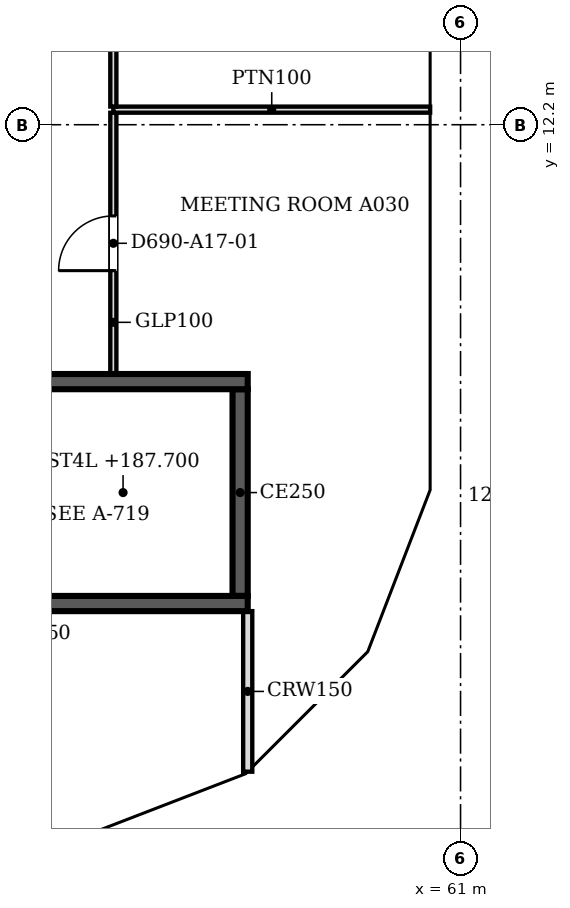
"""IFC4 building model, lengths in metres.
Left out: names, types, materials, properties, quantities, classifications, styles, units other than length and angle.
Written with IfcOpenShell. Run it as: python <this file> out.ifc"""

import sys

from ifc_helpers import new_model, si_unit, direction, frame, frame_2d, origin, place, context, subcontext, project, spatial, polyline, rectangle, outline, extrude, faceted_brep, source, transform, mapped, element, fill, save


model = new_model("IFC4")
c1 = context("Model", 3, precision=1e-05, world=origin(), true_north=direction((0.0, 1.0)))
c2 = subcontext(c1, "Body", "Model", "MODEL_VIEW")
j1 = project(units=[si_unit("LENGTHUNIT", "METRE"), si_unit("PLANEANGLEUNIT", "RADIAN")], contexts=[c1])
p1 = place(None, origin())
s1 = spatial("IfcSite", under=j1, at=p1, CompositionType="ELEMENT")
p2 = place(p1, origin())
s2 = spatial("IfcBuilding", under=s1, at=p2, CompositionType="ELEMENT")
p3 = place(p2, frame((0.0, 0.0, 185.8)))
s3 = spatial("IfcBuildingStorey", under=s2, at=p3, CompositionType="ELEMENT", Elevation=185.8)
m1 = source(origin(), c2, "Body", "Brep", [
    faceted_brep([(0.047, -0.25, 0.0), (2.997, -0.25, 3.8), (0.047, -0.25, 7.6), (0.0, -0.25, 7.541), (0.0, -0.25, 0.059), (0.093, 0.25, 7.54), (2.944, 0.25, 3.868), (2.944, 0.25, 3.732), (0.093, 0.25, 0.06), (2.997, 0.0, 3.8), (0.047, 0.0, 0.0), (0.047, 0.0, 7.6)], [[[0, 1, 2, 3, 4]], [[5, 6, 7, 8]], [[8, 7, 9, 1, 0, 10]], [[6, 5, 11, 2, 1, 9]], [[3, 2, 11]], [[10, 0, 4]], [[8, 10, 4, 3, 11, 5]], [[9, 7, 6]]]),
])
p4 = place(p3, frame((54.81, 0.233, -3.8), z_axis=(0.0, 0.0, 1.0), x_axis=(0.932990326376, 0.359901446078, 0.0)))
e1 = element("IfcWall", 1, at=p4, inside=s3, PredefinedType="SOLIDWALL", context=c2, shape_type="MappedRepresentation", body=[
    mapped(m1, transform((0.0, 0.0, 0.0), scale=1.0)),
])
m2 = source(origin(), c2, "Body", "SweptSolid", [
    extrude(outline(polyline([(0.247, 0.665), (2.681, 3.8), (0.247, 6.935), (0.247, 0.665)])), frame((0.0, 0.26, 0.0), z_axis=(0.0, -1.0, 0.0), x_axis=(1.0, 0.0, 0.0)), (0.0, 0.0, 1.0), 0.52),
])
p5 = place(p4, origin())
e2 = element("IfcOpeningElement", 2, at=p5, cuts=e1, PredefinedType="OPENING", context=c2, shape_type="MappedRepresentation", body=[
    mapped(m2, transform((0.0, 0.0, 0.0), scale=1.0)),
])
m3 = source(origin(), c2, "Body", "Brep", [
    faceted_brep([(2.944, -0.25, 0.0), (2.997, -0.25, 0.068), (2.997, -0.25, 7.532), (2.944, -0.25, 7.6), (0.0, -0.25, 3.8), (0.053, 0.25, 3.868), (2.891, 0.25, 7.532), (2.891, 0.25, 0.068), (0.053, 0.25, 3.732), (2.944, 0.0, 0.0), (2.944, 0.0, 7.6), (0.0, 0.0, 3.8)], [[[0, 1, 2, 3, 4]], [[5, 6, 7, 8]], [[1, 0, 9]], [[10, 3, 2]], [[6, 5, 11, 4, 3, 10]], [[8, 7, 9, 0, 4, 11]], [[8, 11, 5]], [[1, 9, 7, 6, 10, 2]]]),
])
p6 = place(p3, frame((57.606, 1.312, -3.8), z_axis=(0.0, 0.0, 1.0), x_axis=(0.707147509625, 0.707066050402, 0.0)))
e3 = element("IfcWall", 3, at=p6, inside=s3, PredefinedType="SOLIDWALL", context=c2, shape_type="MappedRepresentation", body=[
    mapped(m3, transform((0.0, 0.0, 0.0), scale=1.0)),
])
m4 = source(origin(), c2, "Body", "SweptSolid", [
    extrude(outline(polyline([(2.744, 6.934), (0.316, 3.8), (2.744, 0.666), (2.744, 6.934)])), frame((0.0, 0.26, 0.0), z_axis=(0.0, -1.0, 0.0), x_axis=(1.0, 0.0, 0.0)), (0.0, 0.0, 1.0), 0.52),
])
p7 = place(p6, origin())
e4 = element("IfcOpeningElement", 4, at=p7, cuts=e3, PredefinedType="OPENING", context=c2, shape_type="MappedRepresentation", body=[
    mapped(m4, transform((0.0, 0.0, 0.0), scale=1.0)),
])
m5 = source(origin(), c2, "Body", "Brep", [
    faceted_brep([(0.053, -0.25, 0.0), (3.003, -0.25, 3.8), (0.053, -0.25, 7.6), (0.0, -0.25, 7.532), (0.0, -0.25, 0.068), (0.106, 0.25, 7.532), (2.957, 0.25, 3.86), (2.957, 0.25, 3.74), (0.106, 0.25, 0.068), (3.003, 0.0, 3.8), (0.053, 0.0, 0.0), (0.053, 0.0, 7.6)], [[[0, 1, 2, 3, 4]], [[5, 6, 7, 8]], [[8, 7, 9, 1, 0, 10]], [[6, 5, 11, 2, 1, 9]], [[3, 2, 11]], [[10, 0, 4]], [[8, 10, 4, 3, 11, 5]], [[9, 7, 6]]]),
])
p8 = place(p3, frame((59.669, 3.344, -3.8), z_axis=(0.0, 0.0, 1.0), x_axis=(0.35992665181, 0.932980602862, 0.0)))
e5 = element("IfcWall", 5, at=p8, inside=s3, PredefinedType="SOLIDWALL", context=c2, shape_type="MappedRepresentation", body=[
    mapped(m5, transform((0.0, 0.0, 0.0), scale=1.0)),
])
m6 = source(origin(), c2, "Body", "SweptSolid", [
    extrude(outline(polyline([(0.253, 0.665), (2.687, 3.8), (0.253, 6.935), (0.253, 0.665)])), frame((0.0, 0.26, 0.0), z_axis=(0.0, -1.0, 0.0), x_axis=(1.0, 0.0, 0.0)), (0.0, 0.0, 1.0), 0.52),
])
p9 = place(p8, origin())
e6 = element("IfcOpeningElement", 6, at=p9, cuts=e5, PredefinedType="OPENING", context=c2, shape_type="MappedRepresentation", body=[
    mapped(m6, transform((0.0, 0.0, 0.0), scale=1.0)),
])
m7 = source(origin(), c2, "Body", "Brep", [
    faceted_brep([(3.003, -0.25, 0.0), (6.053, -0.25, 3.8), (3.003, -0.25, 7.6), (0.0, -0.25, 3.8), (0.047, 0.25, 3.859), (3.003, 0.25, 7.6), (6.053, 0.25, 3.8), (3.003, 0.25, 0.0), (0.047, 0.25, 3.741), (0.0, 0.0, 3.8)], [[[0, 1, 2, 3]], [[4, 5, 6, 7, 8]], [[7, 6, 1, 0]], [[6, 5, 2, 1]], [[5, 4, 9, 3, 2]], [[8, 7, 0, 3, 9]], [[8, 9, 4]]]),
])
p10 = place(p3, frame((60.75, 6.146, -3.8), z_axis=(0.0, 0.0, 1.0), x_axis=(0.0, 1.0, 0.0)))
e7 = element("IfcWall", 7, at=p10, inside=s3, PredefinedType="SOLIDWALL", context=c2, shape_type="MappedRepresentation", body=[
    mapped(m7, transform((0.0, 0.0, 0.0), scale=1.0)),
])
m8 = source(origin(), c2, "Body", "SweptSolid", [
    extrude(outline(polyline([(3.005, 0.401), (5.733, 3.8), (3.005, 7.199), (0.319, 3.8), (3.005, 0.401)])), frame((0.0, 0.26, 0.0), z_axis=(0.0, -1.0, 0.0), x_axis=(1.0, 0.0, 0.0)), (0.0, 0.0, 1.0), 0.52),
])
p11 = place(p10, origin())
e8 = element("IfcOpeningElement", 8, at=p11, cuts=e7, PredefinedType="OPENING", context=c2, shape_type="MappedRepresentation", body=[
    mapped(m8, transform((0.0, 0.0, 0.0), scale=1.0)),
])
m9 = source(origin(), c2, "Body", "SweptSolid", [
    extrude(outline(polyline([(3.05, 0.0), (6.1, 3.8), (3.05, 7.6), (0.0, 3.8), (3.05, 0.0)])), frame((0.0, 0.25, 0.0), z_axis=(0.0, -1.0, 0.0), x_axis=(1.0, 0.0, 0.0)), (0.0, 0.0, 1.0), 0.5),
])
p12 = place(p3, frame((60.75, 12.2, -3.8), z_axis=(0.0, 0.0, 1.0), x_axis=(0.0, 1.0, 0.0)))
e9 = element("IfcWall", 9, at=p12, inside=s3, PredefinedType="SOLIDWALL", context=c2, shape_type="MappedRepresentation", body=[
    mapped(m9, transform((0.0, 0.0, 0.0), scale=1.0)),
])
m10 = source(origin(), c2, "Body", "SweptSolid", [
    extrude(outline(polyline([(3.05, 0.399), (5.78, 3.8), (3.05, 7.201), (0.321, 3.8), (3.05, 0.399)])), frame((0.0, 0.26, 0.0), z_axis=(0.0, -1.0, 0.0), x_axis=(1.0, 0.0, 0.0)), (0.0, 0.0, 1.0), 0.52),
])
p13 = place(p12, origin())
e10 = element("IfcOpeningElement", 10, at=p13, cuts=e9, PredefinedType="OPENING", context=c2, shape_type="MappedRepresentation", body=[
    mapped(m10, transform((0.0, 0.0, 0.0), scale=1.0)),
])
p14 = place(p2, frame((0.0, 0.0, 189.6)))
s4 = spatial("IfcBuildingStorey", under=s2, at=p14, CompositionType="ELEMENT", Elevation=189.6)
m11 = source(origin(), c2, "Body", "Brep", [
    faceted_brep([(2.95, -0.25, 0.0), (3.003, -0.25, 0.068), (3.003, -0.25, 7.531), (2.95, -0.25, 7.6), (0.0, -0.25, 3.8), (0.047, 0.25, 3.86), (2.898, 0.25, 7.532), (2.898, 0.25, 0.068), (0.047, 0.25, 3.74), (2.95, 0.0, 0.0), (2.95, 0.0, 7.6), (0.0, 0.0, 3.8)], [[[0, 1, 2, 3, 4]], [[5, 6, 7, 8]], [[1, 0, 9]], [[10, 3, 2]], [[6, 5, 11, 4, 3, 10]], [[8, 7, 9, 0, 4, 11]], [[8, 11, 5]], [[1, 9, 7, 6, 10, 2]]]),
])
p15 = place(p14, frame((54.854, 0.25, -3.8), z_axis=(0.0, 0.0, 1.0), x_axis=(0.932970071518, 0.359953949349, 0.0)))
e11 = element("IfcWall", 11, at=p15, inside=s4, PredefinedType="SOLIDWALL", context=c2, shape_type="MappedRepresentation", body=[
    mapped(m11, transform((0.0, 0.0, 0.0), scale=1.0)),
])
m12 = source(origin(), c2, "Body", "SweptSolid", [
    extrude(outline(polyline([(2.75, 6.935), (0.316, 3.8), (2.75, 0.665), (2.75, 6.935)])), frame((0.0, 0.26, 0.0), z_axis=(0.0, -1.0, 0.0), x_axis=(1.0, 0.0, 0.0)), (0.0, 0.0, 1.0), 0.52),
])
p16 = place(p15, origin())
e12 = element("IfcOpeningElement", 12, at=p16, cuts=e11, PredefinedType="OPENING", context=c2, shape_type="MappedRepresentation", body=[
    mapped(m12, transform((0.0, 0.0, 0.0), scale=1.0)),
])
m13 = source(origin(), c2, "Body", "Brep", [
    faceted_brep([(0.053, -0.25, 0.0), (2.997, -0.25, 3.8), (0.053, -0.25, 7.6), (0.0, -0.25, 7.532), (0.0, -0.25, 0.068), (0.106, 0.25, 7.531), (2.944, 0.25, 3.868), (2.944, 0.25, 3.732), (0.106, 0.25, 0.068), (2.997, 0.0, 3.8), (0.053, 0.0, 0.0), (0.053, 0.0, 7.6)], [[[0, 1, 2, 3, 4]], [[5, 6, 7, 8]], [[8, 7, 9, 1, 0, 10]], [[6, 5, 11, 2, 1, 9]], [[3, 2, 11]], [[10, 0, 4]], [[8, 10, 4, 3, 11, 5]], [[7, 6, 9]]]),
])
p17 = place(p14, frame((57.569, 1.274, -3.8), z_axis=(0.0, 0.0, 1.0), x_axis=(0.707066050402, 0.707147509625, 0.0)))
e13 = element("IfcWall", 13, at=p17, inside=s4, PredefinedType="SOLIDWALL", context=c2, shape_type="MappedRepresentation", body=[
    mapped(m13, transform((0.0, 0.0, 0.0), scale=1.0)),
])
m14 = source(origin(), c2, "Body", "SweptSolid", [
    extrude(outline(polyline([(0.253, 0.666), (2.681, 3.8), (0.253, 6.934), (0.253, 0.666)])), frame((0.0, 0.26, 0.0), z_axis=(0.0, -1.0, 0.0), x_axis=(1.0, 0.0, 0.0)), (0.0, 0.0, 1.0), 0.52),
])
p18 = place(p17, origin())
e14 = element("IfcOpeningElement", 14, at=p18, cuts=e13, PredefinedType="OPENING", context=c2, shape_type="MappedRepresentation", body=[
    mapped(m14, transform((0.0, 0.0, 0.0), scale=1.0)),
])
m15 = source(origin(), c2, "Body", "Brep", [
    faceted_brep([(2.95, -0.25, 0.0), (2.997, -0.25, 0.059), (2.997, -0.25, 7.541), (2.95, -0.25, 7.6), (0.0, -0.25, 3.8), (0.053, 0.25, 3.868), (2.904, 0.25, 7.54), (2.904, 0.25, 0.06), (0.053, 0.25, 3.732), (2.95, 0.0, 0.0), (2.95, 0.0, 7.6), (0.0, 0.0, 3.8)], [[[0, 1, 2, 3, 4]], [[5, 6, 7, 8]], [[1, 0, 9]], [[10, 3, 2]], [[6, 5, 11, 4, 3, 10]], [[8, 7, 9, 0, 4, 11]], [[8, 11, 5]], [[1, 9, 7, 6, 10, 2]]]),
])
p19 = place(p14, frame((59.688, 3.394, -3.8), z_axis=(0.0, 0.0, 1.0), x_axis=(0.359972353723, 0.932962970624, 0.0)))
e15 = element("IfcWall", 15, at=p19, inside=s4, PredefinedType="SOLIDWALL", context=c2, shape_type="MappedRepresentation", body=[
    mapped(m15, transform((0.0, 0.0, 0.0), scale=1.0)),
])
p20 = place(p19, origin())
e16 = element("IfcOpeningElement", 16, at=p20, cuts=e15, PredefinedType="OPENING", context=c2, shape_type="MappedRepresentation", body=[
    mapped(m12, transform((0.0, 0.0, 0.0), scale=1.0)),
])
m16 = source(origin(), c2, "Body", "Brep", [
    faceted_brep([(0.047, -0.25, 0.0), (3.05, -0.25, 3.8), (0.047, -0.25, 7.6), (0.0, -0.25, 7.54), (0.0, -0.25, 0.06), (0.093, 0.25, 7.541), (3.05, 0.25, 3.8), (0.093, 0.25, 0.059), (0.047, 0.0, 0.0), (0.047, 0.0, 7.6)], [[[0, 1, 2, 3, 4]], [[5, 6, 7]], [[7, 6, 1, 0, 8]], [[6, 5, 9, 2, 1]], [[3, 2, 9]], [[8, 0, 4]], [[7, 8, 4, 3, 9, 5]]]),
])
p21 = place(p14, frame((60.75, 6.1, -3.8), z_axis=(0.0, 0.0, 1.0), x_axis=(0.0, 1.0, 0.0)))
e17 = element("IfcWall", 17, at=p21, inside=s4, PredefinedType="SOLIDWALL", context=c2, shape_type="MappedRepresentation", body=[
    mapped(m16, transform((0.0, 0.0, 0.0), scale=1.0)),
])
m17 = source(origin(), c2, "Body", "SweptSolid", [
    extrude(outline(polyline([(0.247, 0.656), (2.731, 3.8), (0.247, 6.944), (0.247, 0.656)])), frame((0.0, 0.26, 0.0), z_axis=(0.0, -1.0, 0.0), x_axis=(1.0, 0.0, 0.0)), (0.0, 0.0, 1.0), 0.52),
])
p22 = place(p21, origin())
e18 = element("IfcOpeningElement", 18, at=p22, cuts=e17, PredefinedType="OPENING", context=c2, shape_type="MappedRepresentation", body=[
    mapped(m17, transform((0.0, 0.0, 0.0), scale=1.0)),
])
m18 = source(origin(), c2, "Body", "SweptSolid", [
    extrude(outline(polyline([(3.05, 0.0), (6.1, 3.8), (3.05, 7.6), (0.0, 3.8), (3.05, 0.0)])), frame((0.0, 0.25, 0.0), z_axis=(0.0, -1.0, 0.0), x_axis=(1.0, 0.0, 0.0)), (0.0, 0.0, 1.0), 0.5),
])
p23 = place(p14, frame((60.75, 9.15, -3.8), z_axis=(0.0, 0.0, 1.0), x_axis=(0.0, 1.0, 0.0)))
e19 = element("IfcWall", 19, at=p23, inside=s4, PredefinedType="SOLIDWALL", context=c2, shape_type="MappedRepresentation", body=[
    mapped(m18, transform((0.0, 0.0, 0.0), scale=1.0)),
])
m19 = source(origin(), c2, "Body", "SweptSolid", [
    extrude(outline(polyline([(3.05, 0.399), (5.78, 3.8), (3.05, 7.2), (0.321, 3.8), (3.05, 0.399)])), frame((0.0, 0.26, 0.0), z_axis=(0.0, -1.0, 0.0), x_axis=(1.0, 0.0, 0.0)), (0.0, 0.0, 1.0), 0.52),
])
p24 = place(p23, origin())
e20 = element("IfcOpeningElement", 20, at=p24, cuts=e19, PredefinedType="OPENING", context=c2, shape_type="MappedRepresentation", body=[
    mapped(m19, transform((0.0, 0.0, 0.0), scale=1.0)),
])
p25 = place(p3, frame((57.5, 4.325, 0.0), z_axis=(0.0, 0.0, 1.0), x_axis=(-1.0, 0.0, 0.0)))
e21 = element("IfcWall", 21, at=p25, inside=s3, PredefinedType="SOLIDWALL", context=c2, shape_type="SweptSolid", body=[
    extrude(rectangle(XDim=8.5, YDim=0.25, at=frame_2d((4.25, 0.0))), origin(), (0.0, 0.0, 1.0), 3.8),
])
m20 = source(origin(), c2, "Body", "SweptSolid", [
    extrude(rectangle(XDim=1.2, YDim=2.1, at=frame_2d((0.6, 1.05))), frame((0.0, 0.135, 0.0), z_axis=(0.0, -1.0, 0.0), x_axis=(1.0, 0.0, 0.0)), (0.0, 0.0, 1.0), 0.27),
])
p26 = place(p25, frame((6.9, 0.0, 0.0)))
e22 = element("IfcOpeningElement", 22, at=p26, cuts=e21, PredefinedType="OPENING", context=c2, shape_type="MappedRepresentation", body=[
    mapped(m20, transform((0.0, 0.0, 0.0), scale=1.0)),
])
p27 = place(p3, frame((49.0, 7.975, 0.0), z_axis=(0.0, 0.0, 1.0), x_axis=(1.0, 0.0, 0.0)))
e23 = element("IfcWall", 23, at=p27, inside=s3, PredefinedType="SOLIDWALL", context=c2, shape_type="SweptSolid", body=[
    extrude(rectangle(XDim=8.5, YDim=0.25, at=frame_2d((4.25, 0.0))), origin(), (0.0, 0.0, 1.0), 3.8),
])
p28 = place(p3, frame((57.375, 7.85, 0.0), z_axis=(0.0, 0.0, 1.0), x_axis=(0.0, -1.0, 0.0)))
e24 = element("IfcWall", 24, at=p28, inside=s3, PredefinedType="SOLIDWALL", context=c2, shape_type="SweptSolid", body=[
    extrude(rectangle(XDim=3.4, YDim=0.25, at=frame_2d((1.7, 0.0))), origin(), (0.0, 0.0, 1.0), 3.8),
])
p29 = place(p3, frame((57.5, 1.559, 0.0), z_axis=(0.0, 0.0, 1.0), x_axis=(0.0, 1.0, 0.0)))
e25 = element("IfcWall", 25, at=p29, inside=s3, PredefinedType="PARTITIONING", context=c2, shape_type="SweptSolid", body=[
    extrude(rectangle(XDim=2.641, YDim=0.15, at=frame_2d((1.32, 0.0))), origin(), (0.0, 0.0, 1.0), 3.067),
])
p30 = place(p3, frame((55.29, 12.397, 0.0), z_axis=(0.0, 0.0, 1.0), x_axis=(0.0, -1.0, 0.0)))
e26 = element("IfcWall", 26, at=p30, inside=s3, PredefinedType="PARTITIONING", context=c2, shape_type="SweptSolid", body=[
    extrude(rectangle(XDim=4.297, YDim=0.1, at=frame_2d((2.148, 0.0))), origin(), (0.0, 0.0, 1.0), 3.067),
])
m21 = source(origin(), c2, "Body", "SweptSolid", [
    extrude(rectangle(XDim=0.9, YDim=2.1, at=frame_2d((0.45, 1.05))), frame((0.0, 0.06, 0.0), z_axis=(0.0, -1.0, 0.0), x_axis=(1.0, 0.0, 0.0)), (0.0, 0.0, 1.0), 0.12),
])
p31 = place(p30, frame((1.697, 0.0, 0.0)))
e27 = element("IfcOpeningElement", 27, at=p31, cuts=e26, PredefinedType="OPENING", context=c2, shape_type="MappedRepresentation", body=[
    mapped(m21, transform((0.0, 0.0, 0.0), scale=1.0)),
])
p32 = place(p3, frame((55.29, 12.448, 0.0), z_axis=(0.0, 0.0, 1.0), x_axis=(1.0, 0.0, 0.0)))
e28 = element("IfcWall", 28, at=p32, inside=s3, PredefinedType="PARTITIONING", context=c2, shape_type="SweptSolid", body=[
    extrude(rectangle(XDim=5.21, YDim=0.1, at=frame_2d((2.605, 0.0))), origin(), (0.0, 0.0, 1.0), 3.067),
])
p33 = place(p3, frame((55.29, 17.024, 0.0), z_axis=(0.0, 0.0, 1.0), x_axis=(0.0, -1.0, 0.0)))
e29 = element("IfcWall", 29, at=p33, inside=s3, PredefinedType="PARTITIONING", context=c2, shape_type="SweptSolid", body=[
    extrude(rectangle(XDim=4.525, YDim=0.1, at=frame_2d((2.263, 0.0))), origin(), (0.0, 0.0, 1.0), 3.067),
])
p34 = place(p33, frame((1.825, 0.0, 0.0)))
e30 = element("IfcOpeningElement", 30, at=p34, cuts=e29, PredefinedType="OPENING", context=c2, shape_type="MappedRepresentation", body=[
    mapped(m21, transform((0.0, 0.0, 0.0), scale=1.0)),
])
m22 = source(origin(), c2, "Body", "SweptSolid", [
    extrude(rectangle(XDim=0.9, YDim=2.1, at=frame_2d((0.45, 1.05))), frame((0.0, 0.025, 0.0), z_axis=(0.0, -1.0, 0.0), x_axis=(1.0, 0.0, 0.0)), (0.0, 0.0, 1.0), 0.05),
])
p35 = place(p31, origin())
e31 = element("IfcDoor", 31, at=p35, inside=s3, OperationType="SINGLE_SWING_RIGHT", PredefinedType="DOOR", context=c2, shape_type="MappedRepresentation", body=[
    mapped(m22, transform((0.0, 0.0, 0.0), scale=1.0)),
])
fill(e27, e31)
save(model, sys.argv[1])
